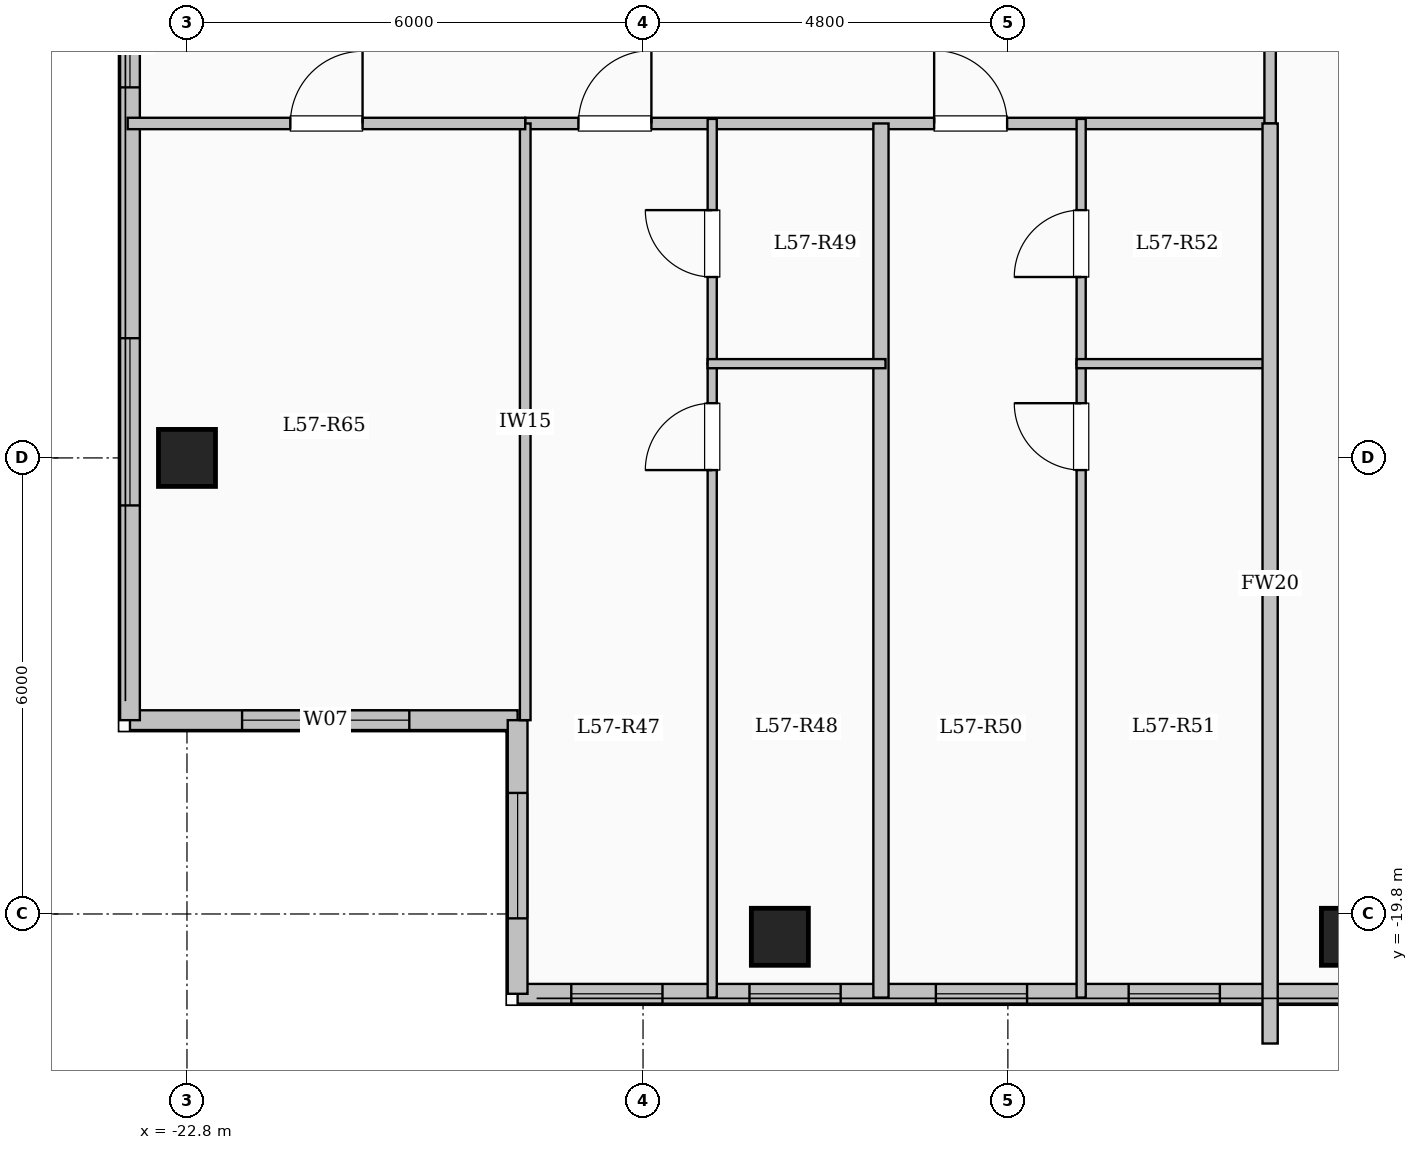
"""IFC4 building model, lengths in metres.
Left out: names, types, materials, properties, quantities, classifications, styles, units other than length and angle.
Written with IfcOpenShell. Run it as: python <this file> out.ifc"""

import sys

from ifc_helpers import new_model, si_unit, direction, frame, frame_2d, origin, origin_2d, place, context, subcontext, project, spatial, rectangle, extrude, element, fill, save


model = new_model("IFC4")
c1 = context("Model", 3, precision=1e-05, world=origin(), true_north=direction((0.0, 1.0)))
c2 = subcontext(c1, "Body", "Model", "MODEL_VIEW")
j1 = project(units=[si_unit("LENGTHUNIT", "METRE"), si_unit("PLANEANGLEUNIT", "RADIAN")], contexts=[c1])
p1 = place(None, origin())
s1 = spatial("IfcSite", under=j1, at=p1, CompositionType="ELEMENT")
p2 = place(p1, origin())
s2 = spatial("IfcBuilding", under=s1, at=p2, CompositionType="ELEMENT")
p3 = place(p2, frame((0.0, 0.0, 210.35)))
s3 = spatial("IfcBuildingStorey", under=s2, at=p3, CompositionType="ELEMENT", Elevation=210.35)
for number, where, z_axis, x_axis in (
    (1, (-15.0, -20.1, 0.0), (0.0, 0.0, 1.0), (1.0, 0.0, 0.0)),
    (2, (-7.5, -20.1, 0.0), (0.0, 0.0, 1.0), (1.0, 0.0, 0.0)),
    (3, (-22.8, -13.8, 0.0), (0.0, 0.0, 1.0), (1.0, 0.0, 0.0)),
):
    element("IfcColumn", number, at=place(p3, frame(where, z_axis=z_axis, x_axis=x_axis)), inside=s3, PredefinedType="COLUMN", context=c2, shape_type="SweptSolid", body=[
        extrude(rectangle(XDim=0.75, YDim=0.75, at=origin_2d()), origin(), (0.0, 0.0, 1.0), 3.35),
    ])
p4 = place(p3, frame((-18.45, -17.25, 0.0), z_axis=(0.0, 0.0, 1.0), x_axis=(-1.0, 0.0, 0.0)))
e4 = element("IfcWall", 4, at=p4, inside=s3, PredefinedType="SOLIDWALL", context=c2, shape_type="SweptSolid", body=[
    extrude(rectangle(XDim=5.1, YDim=0.26, at=frame_2d((2.55, 0.0))), origin(), (0.0, 0.0, 1.0), 3.1),
])
p5 = place(p4, frame((1.425, 0.0, 0.9)))
e5 = element("IfcOpeningElement", 5, at=p5, cuts=e4, PredefinedType="OPENING", context=c2, shape_type="SweptSolid", body=[
    extrude(rectangle(XDim=2.2, YDim=1.75, at=frame_2d((1.1, 0.875))), frame((0.0, 0.14, 0.0), z_axis=(0.0, -1.0, 0.0), x_axis=(1.0, 0.0, 0.0)), (0.0, 0.0, 1.0), 0.28),
])
p6 = place(p3, frame((-23.55, -17.25, 0.0), z_axis=(0.0, 0.0, 1.0), x_axis=(0.0, 1.0, 0.0)))
e6 = element("IfcWall", 6, at=p6, inside=s3, PredefinedType="SOLIDWALL", context=c2, shape_type="SweptSolid", body=[
    extrude(rectangle(XDim=34.5, YDim=0.26, at=frame_2d((17.25, 0.0))), origin(), (0.0, 0.0, 1.0), 3.1),
])
p7 = place(p6, frame((2.825, 0.0, 0.9)))
e7 = element("IfcOpeningElement", 7, at=p7, cuts=e6, PredefinedType="OPENING", context=c2, shape_type="SweptSolid", body=[
    extrude(rectangle(XDim=2.2, YDim=1.75, at=frame_2d((1.1, 0.875))), frame((0.0, 0.14, 0.0), z_axis=(0.0, -1.0, 0.0), x_axis=(1.0, 0.0, 0.0)), (0.0, 0.0, 1.0), 0.28),
])
p8 = place(p6, frame((8.325, 0.0, 0.95)))
e8 = element("IfcOpeningElement", 8, at=p8, cuts=e6, PredefinedType="OPENING", context=c2, shape_type="SweptSolid", body=[
    extrude(rectangle(XDim=1.2, YDim=1.5, at=frame_2d((0.6, 0.75))), frame((0.0, 0.14, 0.0), z_axis=(0.0, -1.0, 0.0), x_axis=(1.0, 0.0, 0.0)), (0.0, 0.0, 1.0), 0.28),
])
p9 = place(p6, frame((13.25, 0.0, 0.9)))
e9 = element("IfcOpeningElement", 9, at=p9, cuts=e6, PredefinedType="OPENING", context=c2, shape_type="SweptSolid", body=[
    extrude(rectangle(XDim=2.2, YDim=1.75, at=frame_2d((1.1, 0.875))), frame((0.0, 0.14, 0.0), z_axis=(0.0, -1.0, 0.0), x_axis=(1.0, 0.0, 0.0)), (0.0, 0.0, 1.0), 0.28),
])
p10 = place(p6, frame((19.65, 0.0, 0.9)))
e10 = element("IfcOpeningElement", 10, at=p10, cuts=e6, PredefinedType="OPENING", context=c2, shape_type="SweptSolid", body=[
    extrude(rectangle(XDim=1.65, YDim=1.6, at=frame_2d((0.825, 0.8))), frame((0.0, 0.14, 0.0), z_axis=(0.0, -1.0, 0.0), x_axis=(1.0, 0.0, 0.0)), (0.0, 0.0, 1.0), 0.28),
])
p11 = place(p6, frame((24.125, 0.0, 0.9)))
e11 = element("IfcOpeningElement", 11, at=p11, cuts=e6, PredefinedType="OPENING", context=c2, shape_type="SweptSolid", body=[
    extrude(rectangle(XDim=2.0, YDim=1.7, at=frame_2d((1.0, 0.85))), frame((0.0, 0.14, 0.0), z_axis=(0.0, -1.0, 0.0), x_axis=(1.0, 0.0, 0.0)), (0.0, 0.0, 1.0), 0.28),
])
p12 = place(p6, frame((28.375, 0.0, 0.95)))
e12 = element("IfcOpeningElement", 12, at=p12, cuts=e6, PredefinedType="OPENING", context=c2, shape_type="SweptSolid", body=[
    extrude(rectangle(XDim=1.0, YDim=1.5, at=frame_2d((0.5, 0.75))), frame((0.0, 0.14, 0.0), z_axis=(0.0, -1.0, 0.0), x_axis=(1.0, 0.0, 0.0)), (0.0, 0.0, 1.0), 0.28),
])
p13 = place(p6, frame((31.125, 0.0, 0.9)))
e13 = element("IfcOpeningElement", 13, at=p13, cuts=e6, PredefinedType="OPENING", context=c2, shape_type="SweptSolid", body=[
    extrude(rectangle(XDim=2.0, YDim=1.7, at=frame_2d((1.0, 0.85))), frame((0.0, 0.14, 0.0), z_axis=(0.0, -1.0, 0.0), x_axis=(1.0, 0.0, 0.0)), (0.0, 0.0, 1.0), 0.28),
])
p14 = place(p3, frame((-7.35, -20.85, 0.0), z_axis=(0.0, 0.0, 1.0), x_axis=(-1.0, 0.0, 0.0)))
e14 = element("IfcWall", 14, at=p14, inside=s3, PredefinedType="SOLIDWALL", context=c2, shape_type="SweptSolid", body=[
    extrude(rectangle(XDim=11.1, YDim=0.26, at=frame_2d((5.55, 0.0))), origin(), (0.0, 0.0, 1.0), 3.1),
])
p15 = place(p14, frame((1.861, 0.0, 0.95)))
e15 = element("IfcOpeningElement", 15, at=p15, cuts=e14, PredefinedType="OPENING", context=c2, shape_type="SweptSolid", body=[
    extrude(rectangle(XDim=1.2, YDim=1.5, at=frame_2d((0.6, 0.75))), frame((0.0, 0.14, 0.0), z_axis=(0.0, -1.0, 0.0), x_axis=(1.0, 0.0, 0.0)), (0.0, 0.0, 1.0), 0.28),
])
p16 = place(p14, frame((4.397, 0.0, 0.95)))
e16 = element("IfcOpeningElement", 16, at=p16, cuts=e14, PredefinedType="OPENING", context=c2, shape_type="SweptSolid", body=[
    extrude(rectangle(XDim=1.2, YDim=1.5, at=frame_2d((0.6, 0.75))), frame((0.0, 0.14, 0.0), z_axis=(0.0, -1.0, 0.0), x_axis=(1.0, 0.0, 0.0)), (0.0, 0.0, 1.0), 0.28),
])
p17 = place(p14, frame((6.85, 0.0, 0.95)))
e17 = element("IfcOpeningElement", 17, at=p17, cuts=e14, PredefinedType="OPENING", context=c2, shape_type="SweptSolid", body=[
    extrude(rectangle(XDim=1.2, YDim=1.5, at=frame_2d((0.6, 0.75))), frame((0.0, 0.14, 0.0), z_axis=(0.0, -1.0, 0.0), x_axis=(1.0, 0.0, 0.0)), (0.0, 0.0, 1.0), 0.28),
])
p18 = place(p14, frame((9.194, 0.0, 0.95)))
e18 = element("IfcOpeningElement", 18, at=p18, cuts=e14, PredefinedType="OPENING", context=c2, shape_type="SweptSolid", body=[
    extrude(rectangle(XDim=1.2, YDim=1.5, at=frame_2d((0.6, 0.75))), frame((0.0, 0.14, 0.0), z_axis=(0.0, -1.0, 0.0), x_axis=(1.0, 0.0, 0.0)), (0.0, 0.0, 1.0), 0.28),
])
p19 = place(p3, frame((-18.45, -20.85, 0.0), z_axis=(0.0, 0.0, 1.0), x_axis=(0.0, 1.0, 0.0)))
e19 = element("IfcWall", 19, at=p19, inside=s3, PredefinedType="SOLIDWALL", context=c2, shape_type="SweptSolid", body=[
    extrude(rectangle(XDim=3.6, YDim=0.26, at=frame_2d((1.8, 0.0))), origin(), (0.0, 0.0, 1.0), 3.1),
])
p20 = place(p19, frame((0.992, 0.0, 0.9)))
e20 = element("IfcOpeningElement", 20, at=p20, cuts=e19, PredefinedType="OPENING", context=c2, shape_type="SweptSolid", body=[
    extrude(rectangle(XDim=1.65, YDim=1.6, at=frame_2d((0.825, 0.8))), frame((0.0, 0.14, 0.0), z_axis=(0.0, -1.0, 0.0), x_axis=(1.0, 0.0, 0.0)), (0.0, 0.0, 1.0), 0.28),
])
p21 = place(p3, frame((-18.35, -9.4, 0.0), z_axis=(0.0, 0.0, 1.0), x_axis=(1.0, 0.0, 0.0)))
e21 = element("IfcWall", 21, at=p21, inside=s3, PredefinedType="PARTITIONING", context=c2, shape_type="SweptSolid", body=[
    extrude(rectangle(XDim=9.8, YDim=0.15, at=frame_2d((4.9, 0.0))), origin(), (0.0, 0.0, 1.0), 3.1),
])
p22 = place(p21, frame((0.7, 0.0, 0.0)))
e22 = element("IfcOpeningElement", 22, at=p22, cuts=e21, PredefinedType="OPENING", context=c2, shape_type="SweptSolid", body=[
    extrude(rectangle(XDim=0.96, YDim=2.15, at=frame_2d((0.48, 1.075))), frame((0.0, 0.085, 0.0), z_axis=(0.0, -1.0, 0.0), x_axis=(1.0, 0.0, 0.0)), (0.0, 0.0, 1.0), 0.17),
])
p23 = place(p21, frame((5.38, 0.0, 0.0)))
e23 = element("IfcOpeningElement", 23, at=p23, cuts=e21, PredefinedType="OPENING", context=c2, shape_type="SweptSolid", body=[
    extrude(rectangle(XDim=0.96, YDim=2.15, at=frame_2d((0.48, 1.075))), frame((0.0, 0.085, 0.0), z_axis=(0.0, -1.0, 0.0), x_axis=(1.0, 0.0, 0.0)), (0.0, 0.0, 1.0), 0.17),
])
p24 = place(p3, frame((-8.55, -9.4, 0.0), z_axis=(0.0, 0.0, 1.0), x_axis=(0.0, 1.0, 0.0)))
e24 = element("IfcWall", 24, at=p24, inside=s3, PredefinedType="PARTITIONING", context=c2, shape_type="SweptSolid", body=[
    extrude(rectangle(XDim=2.15, YDim=0.15, at=frame_2d((1.075, 0.0))), origin(), (0.0, 0.0, 1.0), 3.1),
])
p25 = place(p3, frame((-13.67, -20.9, 0.0), z_axis=(0.0, 0.0, 1.0), x_axis=(0.0, 1.0, 0.0)))
e25 = element("IfcWall", 25, at=p25, inside=s3, PredefinedType="SOLIDWALL", context=c2, shape_type="SweptSolid", body=[
    extrude(rectangle(XDim=11.5, YDim=0.2, at=frame_2d((5.75, 0.0))), origin(), (0.0, 0.0, 1.0), 3.1),
])
p26 = place(p3, frame((-15.89, -20.9, 0.0), z_axis=(0.0, 0.0, 1.0), x_axis=(0.0, 1.0, 0.0)))
e26 = element("IfcWall", 26, at=p26, inside=s3, PredefinedType="PARTITIONING", context=c2, shape_type="SweptSolid", body=[
    extrude(rectangle(XDim=8.34, YDim=0.12, at=frame_2d((4.17, 0.0))), origin(), (0.0, 0.0, 1.0), 3.1),
])
p27 = place(p26, frame((6.94, 0.0, 0.0)))
e27 = element("IfcOpeningElement", 27, at=p27, cuts=e26, PredefinedType="OPENING", context=c2, shape_type="SweptSolid", body=[
    extrude(rectangle(XDim=0.88, YDim=2.1, at=frame_2d((0.44, 1.05))), frame((0.0, 0.07, 0.0), z_axis=(0.0, -1.0, 0.0), x_axis=(1.0, 0.0, 0.0)), (0.0, 0.0, 1.0), 0.14),
])
p28 = place(p3, frame((-15.89, -12.56, 0.0), z_axis=(0.0, 0.0, 1.0), x_axis=(0.0, 1.0, 0.0)))
e28 = element("IfcWall", 28, at=p28, inside=s3, PredefinedType="PARTITIONING", context=c2, shape_type="SweptSolid", body=[
    extrude(rectangle(XDim=3.22, YDim=0.12, at=frame_2d((1.61, 0.0))), origin(), (0.0, 0.0, 1.0), 3.1),
])
p29 = place(p28, frame((1.14, 0.0, 0.0)))
e29 = element("IfcOpeningElement", 29, at=p29, cuts=e28, PredefinedType="OPENING", context=c2, shape_type="SweptSolid", body=[
    extrude(rectangle(XDim=0.88, YDim=2.1, at=frame_2d((0.44, 1.05))), frame((0.0, 0.07, 0.0), z_axis=(0.0, -1.0, 0.0), x_axis=(1.0, 0.0, 0.0)), (0.0, 0.0, 1.0), 0.14),
])
p30 = place(p3, frame((-15.95, -12.56, 0.0), z_axis=(0.0, 0.0, 1.0), x_axis=(1.0, 0.0, 0.0)))
e30 = element("IfcWall", 30, at=p30, inside=s3, PredefinedType="PARTITIONING", context=c2, shape_type="SweptSolid", body=[
    extrude(rectangle(XDim=2.34, YDim=0.12, at=frame_2d((1.17, 0.0))), origin(), (0.0, 0.0, 1.0), 2.725),
])
p31 = place(p3, frame((-11.036, -20.9, 0.0), z_axis=(0.0, 0.0, 1.0), x_axis=(0.0, 1.0, 0.0)))
e31 = element("IfcWall", 31, at=p31, inside=s3, PredefinedType="PARTITIONING", context=c2, shape_type="SweptSolid", body=[
    extrude(rectangle(XDim=8.34, YDim=0.12, at=frame_2d((4.17, 0.0))), origin(), (0.0, 0.0, 1.0), 3.1),
])
p32 = place(p31, frame((6.94, 0.0, 0.0)))
e32 = element("IfcOpeningElement", 32, at=p32, cuts=e31, PredefinedType="OPENING", context=c2, shape_type="SweptSolid", body=[
    extrude(rectangle(XDim=0.88, YDim=2.1, at=frame_2d((0.44, 1.05))), frame((0.0, 0.07, 0.0), z_axis=(0.0, -1.0, 0.0), x_axis=(1.0, 0.0, 0.0)), (0.0, 0.0, 1.0), 0.14),
])
p33 = place(p3, frame((-11.036, -12.56, 0.0), z_axis=(0.0, 0.0, 1.0), x_axis=(0.0, 1.0, 0.0)))
e33 = element("IfcWall", 33, at=p33, inside=s3, PredefinedType="PARTITIONING", context=c2, shape_type="SweptSolid", body=[
    extrude(rectangle(XDim=3.22, YDim=0.12, at=frame_2d((1.61, 0.0))), origin(), (0.0, 0.0, 1.0), 3.1),
])
p34 = place(p33, frame((1.14, 0.0, 0.0)))
e34 = element("IfcOpeningElement", 34, at=p34, cuts=e33, PredefinedType="OPENING", context=c2, shape_type="SweptSolid", body=[
    extrude(rectangle(XDim=0.88, YDim=2.1, at=frame_2d((0.44, 1.05))), frame((0.0, 0.07, 0.0), z_axis=(0.0, -1.0, 0.0), x_axis=(1.0, 0.0, 0.0)), (0.0, 0.0, 1.0), 0.14),
])
p35 = place(p3, frame((-11.096, -12.56, 0.0), z_axis=(0.0, 0.0, 1.0), x_axis=(1.0, 0.0, 0.0)))
e35 = element("IfcWall", 35, at=p35, inside=s3, PredefinedType="PARTITIONING", context=c2, shape_type="SweptSolid", body=[
    extrude(rectangle(XDim=2.556, YDim=0.12, at=frame_2d((1.278, 0.0))), origin(), (0.0, 0.0, 1.0), 2.725),
])
p36 = place(p3, frame((-8.55, -21.504, 0.0), z_axis=(0.0, 0.0, 1.0), x_axis=(0.0, 1.0, 0.0)))
e36 = element("IfcWall", 36, at=p36, inside=s3, PredefinedType="SOLIDWALL", context=c2, shape_type="SweptSolid", body=[
    extrude(rectangle(XDim=12.104, YDim=0.2, at=frame_2d((6.052, 0.0))), origin(), (0.0, 0.0, 1.0), 3.1),
])
p37 = place(p3, frame((-18.35, -17.25, 0.0), z_axis=(0.0, 0.0, 1.0), x_axis=(0.0, 1.0, 0.0)))
e37 = element("IfcWall", 37, at=p37, inside=s3, PredefinedType="PARTITIONING", context=c2, shape_type="SweptSolid", body=[
    extrude(rectangle(XDim=7.85, YDim=0.14, at=frame_2d((3.925, 0.0))), origin(), (0.0, 0.0, 1.0), 3.1),
])
p38 = place(p3, frame((-23.58, -9.4, 0.0), z_axis=(0.0, 0.0, 1.0), x_axis=(1.0, 0.0, 0.0)))
e38 = element("IfcWall", 38, at=p38, inside=s3, PredefinedType="PARTITIONING", context=c2, shape_type="SweptSolid", body=[
    extrude(rectangle(XDim=5.23, YDim=0.15, at=frame_2d((2.615, 0.0))), origin(), (0.0, 0.0, 1.0), 3.1),
])
p39 = place(p38, frame((2.14, 0.0, 0.0)))
e39 = element("IfcOpeningElement", 39, at=p39, cuts=e38, PredefinedType="OPENING", context=c2, shape_type="SweptSolid", body=[
    extrude(rectangle(XDim=0.95, YDim=2.15, at=frame_2d((0.475, 1.075))), frame((0.0, 0.085, 0.0), z_axis=(0.0, -1.0, 0.0), x_axis=(1.0, 0.0, 0.0)), (0.0, 0.0, 1.0), 0.17),
])
p40 = place(p5, origin())
e40 = element("IfcWindow", 40, at=p40, inside=s3, PartitioningType="SINGLE_PANEL", PredefinedType="WINDOW", context=c2, shape_type="SweptSolid", body=[
    extrude(rectangle(XDim=2.2, YDim=1.75, at=frame_2d((1.1, 0.875))), frame((0.0, 0.03, 0.0), z_axis=(0.0, -1.0, 0.0), x_axis=(1.0, 0.0, 0.0)), (0.0, 0.0, 1.0), 0.06),
])
fill(e5, e40)
p41 = place(p7, origin())
e41 = element("IfcWindow", 41, at=p41, inside=s3, PartitioningType="SINGLE_PANEL", PredefinedType="WINDOW", context=c2, shape_type="SweptSolid", body=[
    extrude(rectangle(XDim=2.2, YDim=1.75, at=frame_2d((1.1, 0.875))), frame((0.0, 0.03, 0.0), z_axis=(0.0, -1.0, 0.0), x_axis=(1.0, 0.0, 0.0)), (0.0, 0.0, 1.0), 0.06),
])
fill(e7, e41)
p42 = place(p8, origin())
e42 = element("IfcWindow", 42, at=p42, inside=s3, PartitioningType="SINGLE_PANEL", PredefinedType="WINDOW", context=c2, shape_type="SweptSolid", body=[
    extrude(rectangle(XDim=1.2, YDim=1.5, at=frame_2d((0.6, 0.75))), frame((0.0, 0.03, 0.0), z_axis=(0.0, -1.0, 0.0), x_axis=(1.0, 0.0, 0.0)), (0.0, 0.0, 1.0), 0.06),
])
fill(e8, e42)
p43 = place(p15, origin())
e43 = element("IfcWindow", 43, at=p43, inside=s3, PartitioningType="SINGLE_PANEL", PredefinedType="WINDOW", context=c2, shape_type="SweptSolid", body=[
    extrude(rectangle(XDim=1.2, YDim=1.5, at=frame_2d((0.6, 0.75))), frame((0.0, 0.03, 0.0), z_axis=(0.0, -1.0, 0.0), x_axis=(1.0, 0.0, 0.0)), (0.0, 0.0, 1.0), 0.06),
])
fill(e15, e43)
p44 = place(p16, origin())
e44 = element("IfcWindow", 44, at=p44, inside=s3, PartitioningType="SINGLE_PANEL", PredefinedType="WINDOW", context=c2, shape_type="SweptSolid", body=[
    extrude(rectangle(XDim=1.2, YDim=1.5, at=frame_2d((0.6, 0.75))), frame((0.0, 0.03, 0.0), z_axis=(0.0, -1.0, 0.0), x_axis=(1.0, 0.0, 0.0)), (0.0, 0.0, 1.0), 0.06),
])
fill(e16, e44)
p45 = place(p17, origin())
e45 = element("IfcWindow", 45, at=p45, inside=s3, PartitioningType="SINGLE_PANEL", PredefinedType="WINDOW", context=c2, shape_type="SweptSolid", body=[
    extrude(rectangle(XDim=1.2, YDim=1.5, at=frame_2d((0.6, 0.75))), frame((0.0, 0.03, 0.0), z_axis=(0.0, -1.0, 0.0), x_axis=(1.0, 0.0, 0.0)), (0.0, 0.0, 1.0), 0.06),
])
fill(e17, e45)
p46 = place(p18, origin())
e46 = element("IfcWindow", 46, at=p46, inside=s3, PartitioningType="SINGLE_PANEL", PredefinedType="WINDOW", context=c2, shape_type="SweptSolid", body=[
    extrude(rectangle(XDim=1.2, YDim=1.5, at=frame_2d((0.6, 0.75))), frame((0.0, 0.03, 0.0), z_axis=(0.0, -1.0, 0.0), x_axis=(1.0, 0.0, 0.0)), (0.0, 0.0, 1.0), 0.06),
])
fill(e18, e46)
p47 = place(p20, origin())
e47 = element("IfcWindow", 47, at=p47, inside=s3, PartitioningType="SINGLE_PANEL", PredefinedType="WINDOW", context=c2, shape_type="SweptSolid", body=[
    extrude(rectangle(XDim=1.65, YDim=1.6, at=frame_2d((0.825, 0.8))), frame((0.0, 0.03, 0.0), z_axis=(0.0, -1.0, 0.0), x_axis=(1.0, 0.0, 0.0)), (0.0, 0.0, 1.0), 0.06),
])
fill(e20, e47)
p48 = place(p22, origin())
e48 = element("IfcDoor", 48, at=p48, inside=s3, OperationType="SINGLE_SWING_RIGHT", PredefinedType="DOOR", context=c2, shape_type="SweptSolid", body=[
    extrude(rectangle(XDim=0.96, YDim=2.15, at=frame_2d((0.48, 1.075))), frame((0.0, 0.025, 0.0), z_axis=(0.0, -1.0, 0.0), x_axis=(1.0, 0.0, 0.0)), (0.0, 0.0, 1.0), 0.05),
])
fill(e22, e48)
p49 = place(p27, origin())
e49 = element("IfcDoor", 49, at=p49, inside=s3, OperationType="SINGLE_SWING_LEFT", PredefinedType="DOOR", context=c2, shape_type="SweptSolid", body=[
    extrude(rectangle(XDim=0.88, YDim=2.1, at=frame_2d((0.44, 1.05))), frame((0.0, 0.025, 0.0), z_axis=(0.0, -1.0, 0.0), x_axis=(1.0, 0.0, 0.0)), (0.0, 0.0, 1.0), 0.05),
])
fill(e27, e49)
p50 = place(p29, origin())
e50 = element("IfcDoor", 50, at=p50, inside=s3, OperationType="SINGLE_SWING_RIGHT", PredefinedType="DOOR", context=c2, shape_type="SweptSolid", body=[
    extrude(rectangle(XDim=0.88, YDim=2.1, at=frame_2d((0.44, 1.05))), frame((0.0, 0.025, 0.0), z_axis=(0.0, -1.0, 0.0), x_axis=(1.0, 0.0, 0.0)), (0.0, 0.0, 1.0), 0.05),
])
fill(e29, e50)
p51 = place(p23, origin())
e51 = element("IfcDoor", 51, at=p51, inside=s3, OperationType="SINGLE_SWING_LEFT", PredefinedType="DOOR", context=c2, shape_type="SweptSolid", body=[
    extrude(rectangle(XDim=0.96, YDim=2.15, at=frame_2d((0.48, 1.075))), frame((0.0, 0.025, 0.0), z_axis=(0.0, -1.0, 0.0), x_axis=(1.0, 0.0, 0.0)), (0.0, 0.0, 1.0), 0.05),
])
fill(e23, e51)
p52 = place(p32, origin())
e52 = element("IfcDoor", 52, at=p52, inside=s3, OperationType="SINGLE_SWING_RIGHT", PredefinedType="DOOR", context=c2, shape_type="SweptSolid", body=[
    extrude(rectangle(XDim=0.88, YDim=2.1, at=frame_2d((0.44, 1.05))), frame((0.0, 0.025, 0.0), z_axis=(0.0, -1.0, 0.0), x_axis=(1.0, 0.0, 0.0)), (0.0, 0.0, 1.0), 0.05),
])
fill(e32, e52)
p53 = place(p34, origin())
e53 = element("IfcDoor", 53, at=p53, inside=s3, OperationType="SINGLE_SWING_LEFT", PredefinedType="DOOR", context=c2, shape_type="SweptSolid", body=[
    extrude(rectangle(XDim=0.88, YDim=2.1, at=frame_2d((0.44, 1.05))), frame((0.0, 0.025, 0.0), z_axis=(0.0, -1.0, 0.0), x_axis=(1.0, 0.0, 0.0)), (0.0, 0.0, 1.0), 0.05),
])
fill(e34, e53)
p54 = place(p39, origin())
e54 = element("IfcDoor", 54, at=p54, inside=s3, OperationType="SINGLE_SWING_RIGHT", PredefinedType="DOOR", context=c2, shape_type="SweptSolid", body=[
    extrude(rectangle(XDim=0.95, YDim=2.15, at=frame_2d((0.475, 1.075))), frame((0.0, 0.025, 0.0), z_axis=(0.0, -1.0, 0.0), x_axis=(1.0, 0.0, 0.0)), (0.0, 0.0, 1.0), 0.05),
])
fill(e39, e54)
save(model, sys.argv[1])
